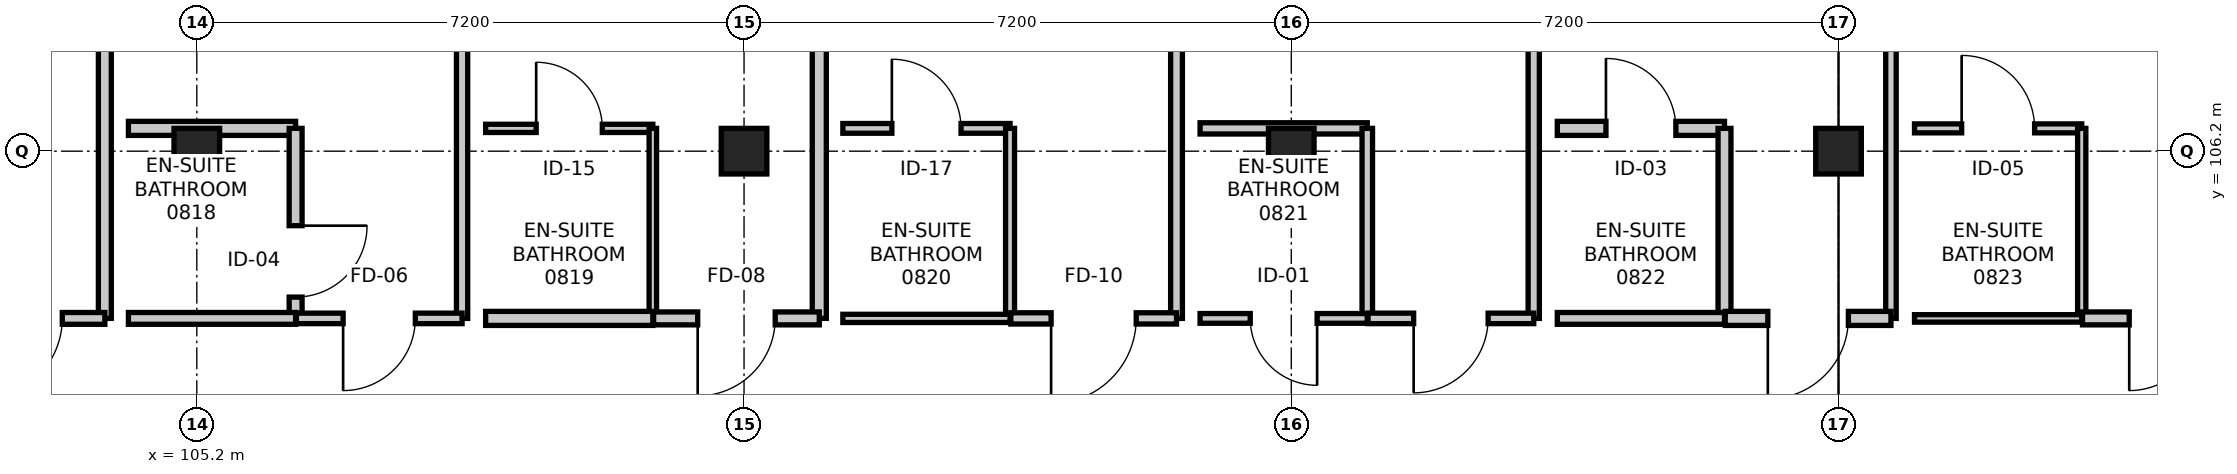
"""IFC4 building model, lengths in metres.
Left out: names, types, materials, properties, quantities, classifications, styles, units other than length and angle.
Written with IfcOpenShell. Run it as: python <this file> out.ifc"""

import sys

from ifc_helpers import new_model, si_unit, direction, frame, frame_2d, origin, origin_2d, place, context, subcontext, project, spatial, rectangle, extrude, element, fill, save


model = new_model("IFC4")
c1 = context("Model", 3, precision=1e-05, world=origin(), true_north=direction((0.0, 1.0)))
c2 = subcontext(c1, "Body", "Model", "MODEL_VIEW")
j1 = project(units=[si_unit("LENGTHUNIT", "METRE"), si_unit("PLANEANGLEUNIT", "RADIAN")], contexts=[c1])
p1 = place(None, origin())
s1 = spatial("IfcSite", under=j1, at=p1, CompositionType="ELEMENT")
p2 = place(p1, origin())
s2 = spatial("IfcBuilding", under=s1, at=p2, CompositionType="ELEMENT")
p3 = place(p2, frame((0.0, 0.0, 33.6)))
s3 = spatial("IfcBuildingStorey", under=s2, at=p3, CompositionType="ELEMENT", Elevation=33.6)
for number, where, z_axis, x_axis in (
    (1, (105.2, 106.2, 0.0), (0.0, 0.0, 1.0), (1.0, 0.0, 0.0)),
    (2, (112.4, 106.2, 0.0), (0.0, 0.0, 1.0), (1.0, 0.0, 0.0)),
    (3, (119.6, 106.2, 0.0), (0.0, 0.0, 1.0), (1.0, 0.0, 0.0)),
    (4, (126.8, 106.2, 0.0), (0.0, 0.0, 1.0), (1.0, 0.0, 0.0)),
):
    element("IfcColumn", number, at=place(p3, frame(where, z_axis=z_axis, x_axis=x_axis)), inside=s3, PredefinedType="COLUMN", context=c2, shape_type="SweptSolid", body=[
        extrude(rectangle(XDim=0.6, YDim=0.6, at=origin_2d()), origin(), (0.0, 0.0, 1.0), 3.6),
    ])
p4 = place(p3, frame((103.99, 116.099, 0.0), z_axis=(0.0, 0.0, 1.0), x_axis=(0.0, -1.0, 0.0)))
e5 = element("IfcWall", 5, at=p4, inside=s3, PredefinedType="PARTITIONING", context=c2, shape_type="SweptSolid", body=[
    extrude(rectangle(XDim=12.099, YDim=0.17, at=frame_2d((6.05, 0.0))), origin(), (0.0, 0.0, 1.0), 2.745),
])
p5 = place(p3, frame((103.99, 104.0, 0.0), z_axis=(0.0, 0.0, 1.0), x_axis=(-1.0, 0.0, 0.0)))
e6 = element("IfcWall", 6, at=p5, inside=s3, PredefinedType="PARTITIONING", context=c2, shape_type="SweptSolid", body=[
    extrude(rectangle(XDim=2.18, YDim=0.155, at=frame_2d((1.09, 0.0))), origin(), (0.0, 0.0, 1.0), 3.36),
])
p6 = place(p5, frame((0.56, 0.0, 0.0)))
e7 = element("IfcOpeningElement", 7, at=p6, cuts=e6, PredefinedType="OPENING", context=c2, shape_type="SweptSolid", body=[
    extrude(rectangle(XDim=1.06, YDim=2.2, at=frame_2d((0.53, 1.1))), frame((0.0, 0.087, 0.0), z_axis=(0.0, -1.0, 0.0), x_axis=(1.0, 0.0, 0.0)), (0.0, 0.0, 1.0), 0.175),
])
p7 = place(p3, frame((104.3, 106.5, 0.0), z_axis=(0.0, 0.0, 1.0), x_axis=(1.0, 0.0, 0.0)))
e8 = element("IfcWall", 8, at=p7, inside=s3, PredefinedType="PARTITIONING", context=c2, shape_type="SweptSolid", body=[
    extrude(rectangle(XDim=2.2, YDim=0.185, at=frame_2d((1.1, 0.0))), origin(), (0.0, 0.0, 1.0), 2.695),
])
p8 = place(p3, frame((106.5, 106.5, 0.0), z_axis=(0.0, 0.0, 1.0), x_axis=(0.0, -1.0, 0.0)))
e9 = element("IfcWall", 9, at=p8, inside=s3, PredefinedType="PARTITIONING", context=c2, shape_type="SweptSolid", body=[
    extrude(rectangle(XDim=2.5, YDim=0.17, at=frame_2d((1.25, 0.0))), origin(), (0.0, 0.0, 1.0), 2.745),
])
p9 = place(p8, frame((1.28, 0.0, 0.0)))
e10 = element("IfcOpeningElement", 10, at=p9, cuts=e9, PredefinedType="OPENING", context=c2, shape_type="SweptSolid", body=[
    extrude(rectangle(XDim=0.94, YDim=2.12, at=frame_2d((0.47, 1.06))), frame((0.0, 0.095, 0.0), z_axis=(0.0, -1.0, 0.0), x_axis=(1.0, 0.0, 0.0)), (0.0, 0.0, 1.0), 0.19),
])
p10 = place(p3, frame((106.5, 104.0, 0.0), z_axis=(0.0, 0.0, 1.0), x_axis=(-1.0, 0.0, 0.0)))
e11 = element("IfcWall", 11, at=p10, inside=s3, PredefinedType="PARTITIONING", context=c2, shape_type="SweptSolid", body=[
    extrude(rectangle(XDim=2.2, YDim=0.155, at=frame_2d((1.1, 0.0))), origin(), (0.0, 0.0, 1.0), 2.695),
])
p11 = place(p3, frame((108.69, 115.994, 0.0), z_axis=(0.0, 0.0, 1.0), x_axis=(0.0, -1.0, 0.0)))
e12 = element("IfcWall", 12, at=p11, inside=s3, PredefinedType="PARTITIONING", context=c2, shape_type="SweptSolid", body=[
    extrude(rectangle(XDim=11.994, YDim=0.148, at=frame_2d((5.997, 0.0))), origin(), (0.0, 0.0, 1.0), 2.745),
])
p12 = place(p3, frame((108.69, 104.0, 0.0), z_axis=(0.0, 0.0, 1.0), x_axis=(-1.0, 0.0, 0.0)))
e13 = element("IfcWall", 13, at=p12, inside=s3, PredefinedType="PARTITIONING", context=c2, shape_type="SweptSolid", body=[
    extrude(rectangle(XDim=2.18, YDim=0.138, at=frame_2d((1.09, 0.0))), origin(), (0.0, 0.0, 1.0), 3.36),
])
p13 = place(p12, frame((0.615, 0.0, 0.0)))
e14 = element("IfcOpeningElement", 14, at=p13, cuts=e13, PredefinedType="OPENING", context=c2, shape_type="SweptSolid", body=[
    extrude(rectangle(XDim=0.95, YDim=2.1, at=frame_2d((0.475, 1.05))), frame((0.0, 0.079, 0.0), z_axis=(0.0, -1.0, 0.0), x_axis=(1.0, 0.0, 0.0)), (0.0, 0.0, 1.0), 0.158),
])
p14 = place(p3, frame((109.0, 106.5, 0.0), z_axis=(0.0, 0.0, 1.0), x_axis=(1.0, 0.0, 0.0)))
e15 = element("IfcWall", 15, at=p14, inside=s3, PredefinedType="PARTITIONING", context=c2, shape_type="SweptSolid", body=[
    extrude(rectangle(XDim=2.2, YDim=0.108, at=frame_2d((1.1, 0.0))), origin(), (0.0, 0.0, 1.0), 3.36),
])
p15 = place(p14, frame((0.665, 0.0, 0.0)))
e16 = element("IfcOpeningElement", 16, at=p15, cuts=e15, PredefinedType="OPENING", context=c2, shape_type="SweptSolid", body=[
    extrude(rectangle(XDim=0.87, YDim=2.07, at=frame_2d((0.435, 1.035))), frame((0.0, 0.064, 0.0), z_axis=(0.0, -1.0, 0.0), x_axis=(1.0, 0.0, 0.0)), (0.0, 0.0, 1.0), 0.128),
])
p16 = place(p3, frame((111.2, 106.5, 0.0), z_axis=(0.0, 0.0, 1.0), x_axis=(0.0, -1.0, 0.0)))
e17 = element("IfcWall", 17, at=p16, inside=s3, PredefinedType="PARTITIONING", context=c2, shape_type="SweptSolid", body=[
    extrude(rectangle(XDim=2.5, YDim=0.098, at=frame_2d((1.25, 0.0))), origin(), (0.0, 0.0, 1.0), 2.745),
])
p17 = place(p3, frame((111.2, 104.0, 0.0), z_axis=(0.0, 0.0, 1.0), x_axis=(-1.0, 0.0, 0.0)))
e18 = element("IfcWall", 18, at=p17, inside=s3, PredefinedType="PARTITIONING", context=c2, shape_type="SweptSolid", body=[
    extrude(rectangle(XDim=2.2, YDim=0.185, at=frame_2d((1.1, 0.0))), origin(), (0.0, 0.0, 1.0), 3.36),
])
p18 = place(p3, frame((113.39, 115.834, 0.0), z_axis=(0.0, 0.0, 1.0), x_axis=(0.0, -1.0, 0.0)))
e19 = element("IfcWall", 19, at=p18, inside=s3, PredefinedType="PARTITIONING", context=c2, shape_type="SweptSolid", body=[
    extrude(rectangle(XDim=11.834, YDim=0.185, at=frame_2d((5.917, 0.0))), origin(), (0.0, 0.0, 1.0), 2.745),
])
p19 = place(p3, frame((113.39, 104.0, 0.0), z_axis=(0.0, 0.0, 1.0), x_axis=(-1.0, 0.0, 0.0)))
e20 = element("IfcWall", 20, at=p19, inside=s3, PredefinedType="PARTITIONING", context=c2, shape_type="SweptSolid", body=[
    extrude(rectangle(XDim=2.18, YDim=0.17, at=frame_2d((1.09, 0.0))), origin(), (0.0, 0.0, 1.0), 2.695),
])
p20 = place(p19, frame((0.58, 0.0, 0.0)))
e21 = element("IfcOpeningElement", 21, at=p20, cuts=e20, PredefinedType="OPENING", context=c2, shape_type="SweptSolid", body=[
    extrude(rectangle(XDim=1.02, YDim=2.15, at=frame_2d((0.51, 1.075))), frame((0.0, 0.095, 0.0), z_axis=(0.0, -1.0, 0.0), x_axis=(1.0, 0.0, 0.0)), (0.0, 0.0, 1.0), 0.19),
])
p21 = place(p3, frame((113.7, 106.5, 0.0), z_axis=(0.0, 0.0, 1.0), x_axis=(1.0, 0.0, 0.0)))
e22 = element("IfcWall", 22, at=p21, inside=s3, PredefinedType="PARTITIONING", context=c2, shape_type="SweptSolid", body=[
    extrude(rectangle(XDim=2.2, YDim=0.128, at=frame_2d((1.1, 0.0))), origin(), (0.0, 0.0, 1.0), 3.36),
])
p22 = place(p21, frame((0.645, 0.0, 0.0)))
e23 = element("IfcOpeningElement", 23, at=p22, cuts=e22, PredefinedType="OPENING", context=c2, shape_type="SweptSolid", body=[
    extrude(rectangle(XDim=0.91, YDim=2.11, at=frame_2d((0.455, 1.055))), frame((0.0, 0.074, 0.0), z_axis=(0.0, -1.0, 0.0), x_axis=(1.0, 0.0, 0.0)), (0.0, 0.0, 1.0), 0.148),
])
p23 = place(p3, frame((115.9, 106.5, 0.0), z_axis=(0.0, 0.0, 1.0), x_axis=(0.0, -1.0, 0.0)))
e24 = element("IfcWall", 24, at=p23, inside=s3, PredefinedType="PARTITIONING", context=c2, shape_type="SweptSolid", body=[
    extrude(rectangle(XDim=2.5, YDim=0.118, at=frame_2d((1.25, 0.0))), origin(), (0.0, 0.0, 1.0), 2.745),
])
p24 = place(p3, frame((115.9, 104.0, 0.0), z_axis=(0.0, 0.0, 1.0), x_axis=(-1.0, 0.0, 0.0)))
e25 = element("IfcWall", 25, at=p24, inside=s3, PredefinedType="PARTITIONING", context=c2, shape_type="SweptSolid", body=[
    extrude(rectangle(XDim=2.2, YDim=0.108, at=frame_2d((1.1, 0.0))), origin(), (0.0, 0.0, 1.0), 3.36),
])
p25 = place(p3, frame((118.09, 115.624, 0.0), z_axis=(0.0, 0.0, 1.0), x_axis=(0.0, -1.0, 0.0)))
e26 = element("IfcWall", 26, at=p25, inside=s3, PredefinedType="PARTITIONING", context=c2, shape_type="SweptSolid", body=[
    extrude(rectangle(XDim=11.624, YDim=0.155, at=frame_2d((5.812, 0.0))), origin(), (0.0, 0.0, 1.0), 2.745),
])
p26 = place(p3, frame((118.09, 104.0, 0.0), z_axis=(0.0, 0.0, 1.0), x_axis=(-1.0, 0.0, 0.0)))
e27 = element("IfcWall", 27, at=p26, inside=s3, PredefinedType="PARTITIONING", context=c2, shape_type="SweptSolid", body=[
    extrude(rectangle(XDim=2.18, YDim=0.148, at=frame_2d((1.09, 0.0))), origin(), (0.0, 0.0, 1.0), 3.36),
])
p27 = place(p26, frame((0.53, 0.0, 0.0)))
e28 = element("IfcOpeningElement", 28, at=p27, cuts=e27, PredefinedType="OPENING", context=c2, shape_type="SweptSolid", body=[
    extrude(rectangle(XDim=1.12, YDim=2.2, at=frame_2d((0.56, 1.1))), frame((0.0, 0.084, 0.0), z_axis=(0.0, -1.0, 0.0), x_axis=(1.0, 0.0, 0.0)), (0.0, 0.0, 1.0), 0.168),
])
p28 = place(p3, frame((118.4, 106.5, 0.0), z_axis=(0.0, 0.0, 1.0), x_axis=(1.0, 0.0, 0.0)))
e29 = element("IfcWall", 29, at=p28, inside=s3, PredefinedType="PARTITIONING", context=c2, shape_type="SweptSolid", body=[
    extrude(rectangle(XDim=2.2, YDim=0.148, at=frame_2d((1.1, 0.0))), origin(), (0.0, 0.0, 1.0), 2.695),
])
p29 = place(p3, frame((120.6, 106.5, 0.0), z_axis=(0.0, 0.0, 1.0), x_axis=(0.0, -1.0, 0.0)))
e30 = element("IfcWall", 30, at=p29, inside=s3, PredefinedType="PARTITIONING", context=c2, shape_type="SweptSolid", body=[
    extrude(rectangle(XDim=2.5, YDim=0.138, at=frame_2d((1.25, 0.0))), origin(), (0.0, 0.0, 1.0), 2.745),
])
p30 = place(p3, frame((120.6, 104.0, 0.0), z_axis=(0.0, 0.0, 1.0), x_axis=(-1.0, 0.0, 0.0)))
e31 = element("IfcWall", 31, at=p30, inside=s3, PredefinedType="PARTITIONING", context=c2, shape_type="SweptSolid", body=[
    extrude(rectangle(XDim=2.2, YDim=0.128, at=frame_2d((1.1, 0.0))), origin(), (0.0, 0.0, 1.0), 2.695),
])
p31 = place(p30, frame((0.66, 0.0, 0.0)))
e32 = element("IfcOpeningElement", 32, at=p31, cuts=e31, PredefinedType="OPENING", context=c2, shape_type="SweptSolid", body=[
    extrude(rectangle(XDim=0.88, YDim=2.06, at=frame_2d((0.44, 1.03))), frame((0.0, 0.074, 0.0), z_axis=(0.0, -1.0, 0.0), x_axis=(1.0, 0.0, 0.0)), (0.0, 0.0, 1.0), 0.148),
])
p32 = place(p3, frame((122.79, 115.369, 0.0), z_axis=(0.0, 0.0, 1.0), x_axis=(0.0, -1.0, 0.0)))
e33 = element("IfcWall", 33, at=p32, inside=s3, PredefinedType="PARTITIONING", context=c2, shape_type="SweptSolid", body=[
    extrude(rectangle(XDim=11.369, YDim=0.148, at=frame_2d((5.685, 0.0))), origin(), (0.0, 0.0, 1.0), 2.745),
])
p33 = place(p3, frame((122.79, 104.0, 0.0), z_axis=(0.0, 0.0, 1.0), x_axis=(-1.0, 0.0, 0.0)))
e34 = element("IfcWall", 34, at=p33, inside=s3, PredefinedType="PARTITIONING", context=c2, shape_type="SweptSolid", body=[
    extrude(rectangle(XDim=2.18, YDim=0.138, at=frame_2d((1.09, 0.0))), origin(), (0.0, 0.0, 1.0), 3.36),
])
p34 = place(p33, frame((0.6, 0.0, 0.0)))
e35 = element("IfcOpeningElement", 35, at=p34, cuts=e34, PredefinedType="OPENING", context=c2, shape_type="SweptSolid", body=[
    extrude(rectangle(XDim=0.98, YDim=2.15, at=frame_2d((0.49, 1.075))), frame((0.0, 0.079, 0.0), z_axis=(0.0, -1.0, 0.0), x_axis=(1.0, 0.0, 0.0)), (0.0, 0.0, 1.0), 0.158),
])
p35 = place(p3, frame((123.1, 106.5, 0.0), z_axis=(0.0, 0.0, 1.0), x_axis=(1.0, 0.0, 0.0)))
e36 = element("IfcWall", 36, at=p35, inside=s3, PredefinedType="PARTITIONING", context=c2, shape_type="SweptSolid", body=[
    extrude(rectangle(XDim=2.2, YDim=0.185, at=frame_2d((1.1, 0.0))), origin(), (0.0, 0.0, 1.0), 2.745),
])
p36 = place(p35, frame((0.64, 0.0, 0.0)))
e37 = element("IfcOpeningElement", 37, at=p36, cuts=e36, PredefinedType="OPENING", context=c2, shape_type="SweptSolid", body=[
    extrude(rectangle(XDim=0.92, YDim=2.1, at=frame_2d((0.46, 1.05))), frame((0.0, 0.103, 0.0), z_axis=(0.0, -1.0, 0.0), x_axis=(1.0, 0.0, 0.0)), (0.0, 0.0, 1.0), 0.205),
])
p37 = place(p3, frame((125.3, 106.5, 0.0), z_axis=(0.0, 0.0, 1.0), x_axis=(0.0, -1.0, 0.0)))
e38 = element("IfcWall", 38, at=p37, inside=s3, PredefinedType="PARTITIONING", context=c2, shape_type="SweptSolid", body=[
    extrude(rectangle(XDim=2.5, YDim=0.17, at=frame_2d((1.25, 0.0))), origin(), (0.0, 0.0, 1.0), 2.745),
])
p38 = place(p3, frame((125.3, 104.0, 0.0), z_axis=(0.0, 0.0, 1.0), x_axis=(-1.0, 0.0, 0.0)))
e39 = element("IfcWall", 39, at=p38, inside=s3, PredefinedType="PARTITIONING", context=c2, shape_type="SweptSolid", body=[
    extrude(rectangle(XDim=2.2, YDim=0.155, at=frame_2d((1.1, 0.0))), origin(), (0.0, 0.0, 1.0), 3.36),
])
p39 = place(p3, frame((127.49, 115.079, 0.0), z_axis=(0.0, 0.0, 1.0), x_axis=(0.0, -1.0, 0.0)))
e40 = element("IfcWall", 40, at=p39, inside=s3, PredefinedType="PARTITIONING", context=c2, shape_type="SweptSolid", body=[
    extrude(rectangle(XDim=11.079, YDim=0.138, at=frame_2d((5.54, 0.0))), origin(), (0.0, 0.0, 1.0), 2.745),
])
p40 = place(p3, frame((127.49, 104.0, 0.0), z_axis=(0.0, 0.0, 1.0), x_axis=(-1.0, 0.0, 0.0)))
e41 = element("IfcWall", 41, at=p40, inside=s3, PredefinedType="PARTITIONING", context=c2, shape_type="SweptSolid", body=[
    extrude(rectangle(XDim=2.18, YDim=0.185, at=frame_2d((1.09, 0.0))), origin(), (0.0, 0.0, 1.0), 2.695),
])
p41 = place(p40, frame((0.56, 0.0, 0.0)))
e42 = element("IfcOpeningElement", 42, at=p41, cuts=e41, PredefinedType="OPENING", context=c2, shape_type="SweptSolid", body=[
    extrude(rectangle(XDim=1.06, YDim=2.2, at=frame_2d((0.53, 1.1))), frame((0.0, 0.103, 0.0), z_axis=(0.0, -1.0, 0.0), x_axis=(1.0, 0.0, 0.0)), (0.0, 0.0, 1.0), 0.205),
])
p42 = place(p3, frame((127.8, 106.5, 0.0), z_axis=(0.0, 0.0, 1.0), x_axis=(1.0, 0.0, 0.0)))
e43 = element("IfcWall", 43, at=p42, inside=s3, PredefinedType="PARTITIONING", context=c2, shape_type="SweptSolid", body=[
    extrude(rectangle(XDim=2.2, YDim=0.118, at=frame_2d((1.1, 0.0))), origin(), (0.0, 0.0, 1.0), 3.36),
])
p43 = place(p42, frame((0.62, 0.0, 0.0)))
e44 = element("IfcOpeningElement", 44, at=p43, cuts=e43, PredefinedType="OPENING", context=c2, shape_type="SweptSolid", body=[
    extrude(rectangle(XDim=0.96, YDim=2.14, at=frame_2d((0.48, 1.07))), frame((0.0, 0.069, 0.0), z_axis=(0.0, -1.0, 0.0), x_axis=(1.0, 0.0, 0.0)), (0.0, 0.0, 1.0), 0.138),
])
p44 = place(p3, frame((130.0, 106.5, 0.0), z_axis=(0.0, 0.0, 1.0), x_axis=(0.0, -1.0, 0.0)))
e45 = element("IfcWall", 45, at=p44, inside=s3, PredefinedType="PARTITIONING", context=c2, shape_type="SweptSolid", body=[
    extrude(rectangle(XDim=2.5, YDim=0.108, at=frame_2d((1.25, 0.0))), origin(), (0.0, 0.0, 1.0), 2.745),
])
p45 = place(p3, frame((130.0, 104.0, 0.0), z_axis=(0.0, 0.0, 1.0), x_axis=(-1.0, 0.0, 0.0)))
e46 = element("IfcWall", 46, at=p45, inside=s3, PredefinedType="PARTITIONING", context=c2, shape_type="SweptSolid", body=[
    extrude(rectangle(XDim=2.2, YDim=0.098, at=frame_2d((1.1, 0.0))), origin(), (0.0, 0.0, 1.0), 3.36),
])
p46 = place(p3, frame((132.19, 104.0, 0.0), z_axis=(0.0, 0.0, 1.0), x_axis=(-1.0, 0.0, 0.0)))
e47 = element("IfcWall", 47, at=p46, inside=s3, PredefinedType="PARTITIONING", context=c2, shape_type="SweptSolid", body=[
    extrude(rectangle(XDim=2.18, YDim=0.17, at=frame_2d((1.09, 0.0))), origin(), (0.0, 0.0, 1.0), 3.36),
])
p47 = place(p46, frame((0.615, 0.0, 0.0)))
e48 = element("IfcOpeningElement", 48, at=p47, cuts=e47, PredefinedType="OPENING", context=c2, shape_type="SweptSolid", body=[
    extrude(rectangle(XDim=0.95, YDim=2.1, at=frame_2d((0.475, 1.05))), frame((0.0, 0.095, 0.0), z_axis=(0.0, -1.0, 0.0), x_axis=(1.0, 0.0, 0.0)), (0.0, 0.0, 1.0), 0.19),
])
p48 = place(p6, origin())
e49 = element("IfcDoor", 49, at=p48, inside=s3, OperationType="SINGLE_SWING_RIGHT", PredefinedType="DOOR", context=c2, shape_type="SweptSolid", body=[
    extrude(rectangle(XDim=1.06, YDim=2.2, at=frame_2d((0.53, 1.1))), frame((0.0, 0.025, 0.0), z_axis=(0.0, -1.0, 0.0), x_axis=(1.0, 0.0, 0.0)), (0.0, 0.0, 1.0), 0.05),
])
fill(e7, e49)
p49 = place(p9, origin())
e50 = element("IfcDoor", 50, at=p49, inside=s3, OperationType="SINGLE_SWING_LEFT", PredefinedType="DOOR", context=c2, shape_type="SweptSolid", body=[
    extrude(rectangle(XDim=0.94, YDim=2.12, at=frame_2d((0.47, 1.06))), frame((0.0, 0.025, 0.0), z_axis=(0.0, -1.0, 0.0), x_axis=(1.0, 0.0, 0.0)), (0.0, 0.0, 1.0), 0.05),
])
fill(e10, e50)
p50 = place(p13, origin())
e51 = element("IfcDoor", 51, at=p50, inside=s3, OperationType="SINGLE_SWING_RIGHT", PredefinedType="DOOR", context=c2, shape_type="SweptSolid", body=[
    extrude(rectangle(XDim=0.95, YDim=2.1, at=frame_2d((0.475, 1.05))), frame((0.0, 0.025, 0.0), z_axis=(0.0, -1.0, 0.0), x_axis=(1.0, 0.0, 0.0)), (0.0, 0.0, 1.0), 0.05),
])
fill(e14, e51)
p51 = place(p15, origin())
e52 = element("IfcDoor", 52, at=p51, inside=s3, OperationType="SINGLE_SWING_LEFT", PredefinedType="DOOR", context=c2, shape_type="SweptSolid", body=[
    extrude(rectangle(XDim=0.87, YDim=2.07, at=frame_2d((0.435, 1.035))), frame((0.0, 0.025, 0.0), z_axis=(0.0, -1.0, 0.0), x_axis=(1.0, 0.0, 0.0)), (0.0, 0.0, 1.0), 0.05),
])
fill(e16, e52)
p52 = place(p20, origin())
e53 = element("IfcDoor", 53, at=p52, inside=s3, OperationType="SINGLE_SWING_RIGHT", PredefinedType="DOOR", context=c2, shape_type="SweptSolid", body=[
    extrude(rectangle(XDim=1.02, YDim=2.15, at=frame_2d((0.51, 1.075))), frame((0.0, 0.025, 0.0), z_axis=(0.0, -1.0, 0.0), x_axis=(1.0, 0.0, 0.0)), (0.0, 0.0, 1.0), 0.05),
])
fill(e21, e53)
p53 = place(p22, origin())
e54 = element("IfcDoor", 54, at=p53, inside=s3, OperationType="SINGLE_SWING_LEFT", PredefinedType="DOOR", context=c2, shape_type="SweptSolid", body=[
    extrude(rectangle(XDim=0.91, YDim=2.11, at=frame_2d((0.455, 1.055))), frame((0.0, 0.025, 0.0), z_axis=(0.0, -1.0, 0.0), x_axis=(1.0, 0.0, 0.0)), (0.0, 0.0, 1.0), 0.05),
])
fill(e23, e54)
p54 = place(p27, origin())
e55 = element("IfcDoor", 55, at=p54, inside=s3, OperationType="SINGLE_SWING_RIGHT", PredefinedType="DOOR", context=c2, shape_type="SweptSolid", body=[
    extrude(rectangle(XDim=1.12, YDim=2.2, at=frame_2d((0.56, 1.1))), frame((0.0, 0.025, 0.0), z_axis=(0.0, -1.0, 0.0), x_axis=(1.0, 0.0, 0.0)), (0.0, 0.0, 1.0), 0.05),
])
fill(e28, e55)
p55 = place(p31, origin())
e56 = element("IfcDoor", 56, at=p55, inside=s3, OperationType="SINGLE_SWING_LEFT", PredefinedType="DOOR", context=c2, shape_type="SweptSolid", body=[
    extrude(rectangle(XDim=0.88, YDim=2.06, at=frame_2d((0.44, 1.03))), frame((0.0, 0.025, 0.0), z_axis=(0.0, -1.0, 0.0), x_axis=(1.0, 0.0, 0.0)), (0.0, 0.0, 1.0), 0.05),
])
fill(e32, e56)
p56 = place(p34, origin())
e57 = element("IfcDoor", 57, at=p56, inside=s3, OperationType="SINGLE_SWING_RIGHT", PredefinedType="DOOR", context=c2, shape_type="SweptSolid", body=[
    extrude(rectangle(XDim=0.98, YDim=2.15, at=frame_2d((0.49, 1.075))), frame((0.0, 0.025, 0.0), z_axis=(0.0, -1.0, 0.0), x_axis=(1.0, 0.0, 0.0)), (0.0, 0.0, 1.0), 0.05),
])
fill(e35, e57)
p57 = place(p36, origin())
e58 = element("IfcDoor", 58, at=p57, inside=s3, OperationType="SINGLE_SWING_LEFT", PredefinedType="DOOR", context=c2, shape_type="SweptSolid", body=[
    extrude(rectangle(XDim=0.92, YDim=2.1, at=frame_2d((0.46, 1.05))), frame((0.0, 0.025, 0.0), z_axis=(0.0, -1.0, 0.0), x_axis=(1.0, 0.0, 0.0)), (0.0, 0.0, 1.0), 0.05),
])
fill(e37, e58)
p58 = place(p41, origin())
e59 = element("IfcDoor", 59, at=p58, inside=s3, OperationType="SINGLE_SWING_RIGHT", PredefinedType="DOOR", context=c2, shape_type="SweptSolid", body=[
    extrude(rectangle(XDim=1.06, YDim=2.2, at=frame_2d((0.53, 1.1))), frame((0.0, 0.025, 0.0), z_axis=(0.0, -1.0, 0.0), x_axis=(1.0, 0.0, 0.0)), (0.0, 0.0, 1.0), 0.05),
])
fill(e42, e59)
p59 = place(p43, origin())
e60 = element("IfcDoor", 60, at=p59, inside=s3, OperationType="SINGLE_SWING_LEFT", PredefinedType="DOOR", context=c2, shape_type="SweptSolid", body=[
    extrude(rectangle(XDim=0.96, YDim=2.14, at=frame_2d((0.48, 1.07))), frame((0.0, 0.025, 0.0), z_axis=(0.0, -1.0, 0.0), x_axis=(1.0, 0.0, 0.0)), (0.0, 0.0, 1.0), 0.05),
])
fill(e44, e60)
p60 = place(p47, origin())
e61 = element("IfcDoor", 61, at=p60, inside=s3, OperationType="SINGLE_SWING_RIGHT", PredefinedType="DOOR", context=c2, shape_type="SweptSolid", body=[
    extrude(rectangle(XDim=0.95, YDim=2.1, at=frame_2d((0.475, 1.05))), frame((0.0, 0.025, 0.0), z_axis=(0.0, -1.0, 0.0), x_axis=(1.0, 0.0, 0.0)), (0.0, 0.0, 1.0), 0.05),
])
fill(e48, e61)
save(model, sys.argv[1])
